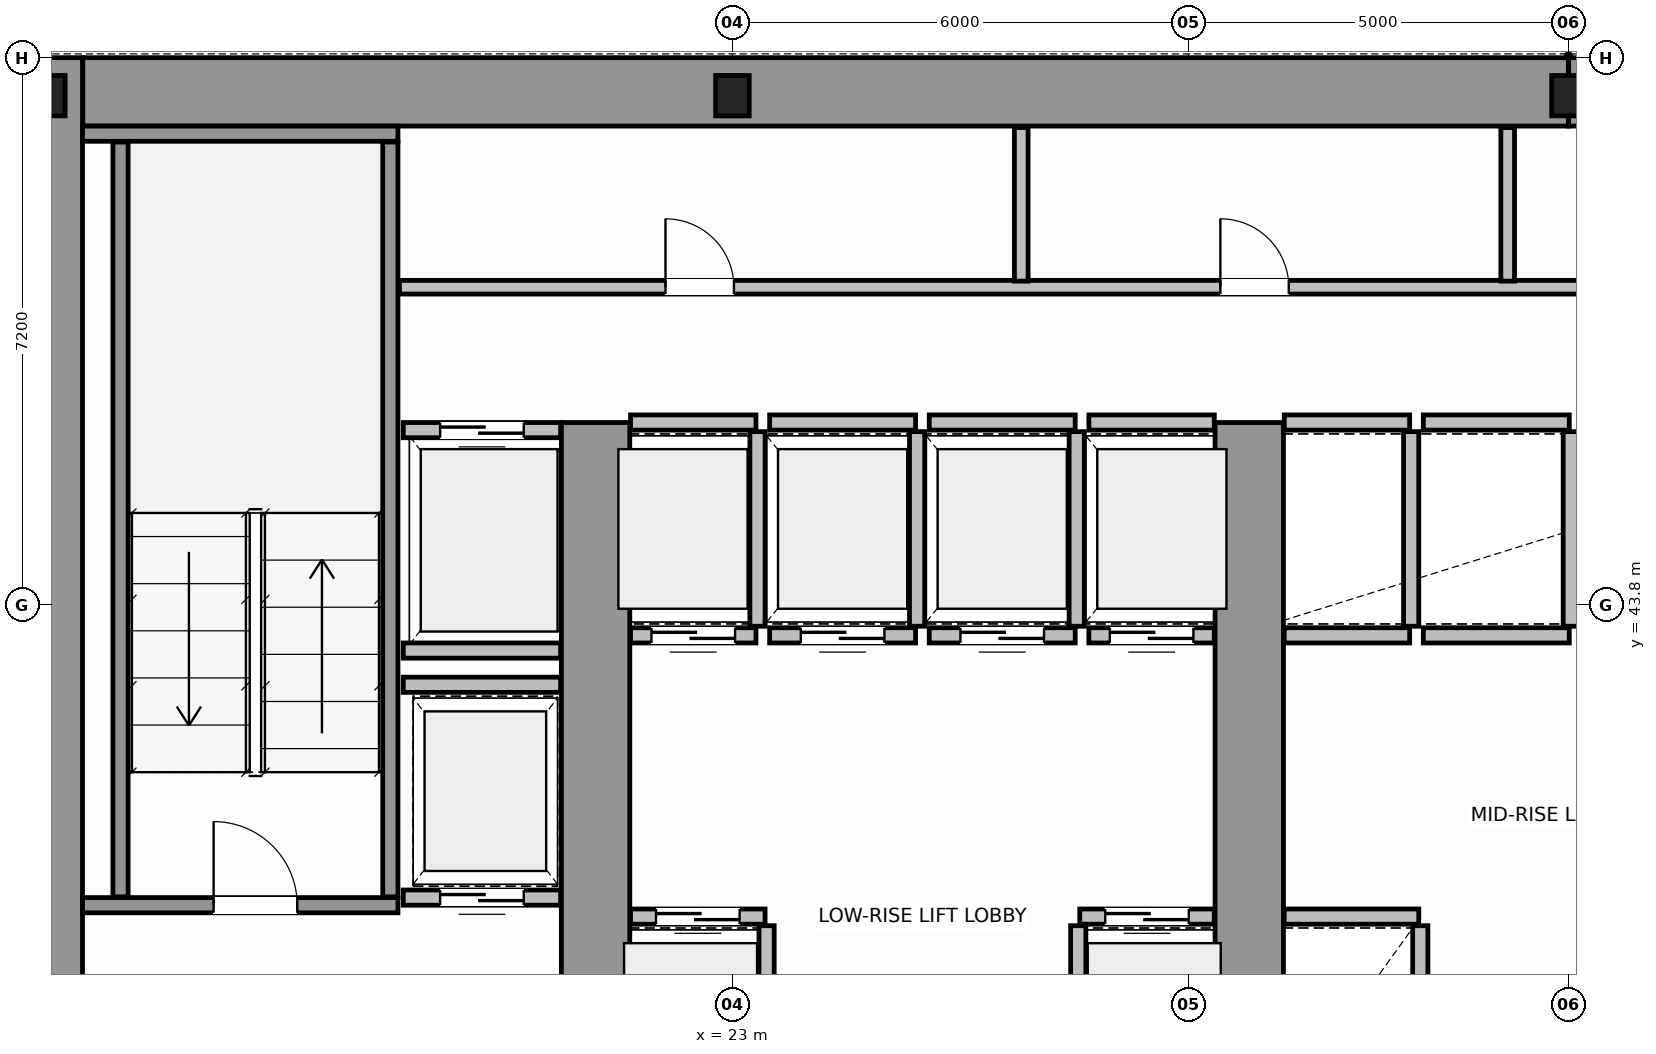
"""IFC4 building model, lengths in metres.
Left out: names, types, materials, properties, quantities, classifications, styles, units other than length and angle.
Written with IfcOpenShell. Run it as: python <this file> out.ifc"""

import sys

from ifc_helpers import new_model, si_unit, direction, frame, frame_2d, origin, origin_2d, place, context, subcontext, project, spatial, rectangle, i_section, extrude, source, transform, mapped, element, fill, save


model = new_model("IFC4")
c1 = context("Model", 3, precision=1e-05, world=origin(), true_north=direction((0.0, 1.0)))
c2 = subcontext(c1, "Body", "Model", "MODEL_VIEW")
j1 = project(units=[si_unit("LENGTHUNIT", "METRE"), si_unit("PLANEANGLEUNIT", "RADIAN")], contexts=[c1])
p1 = place(None, origin())
s1 = spatial("IfcSite", under=j1, at=p1, CompositionType="ELEMENT")
p2 = place(p1, origin())
s2 = spatial("IfcBuilding", under=s1, at=p2, CompositionType="ELEMENT")
p3 = place(p2, frame((0.0, 0.0, 72.0)))
s3 = spatial("IfcBuildingStorey", under=s2, at=p3, CompositionType="ELEMENT", Elevation=72.0)
m1 = source(origin(), c2, "Body", "SweptSolid", [
    extrude(i_section(OverallWidth=0.442, OverallDepth=0.531, WebThickness=0.065, FlangeThickness=0.076, FilletRadius=0.015, at=origin_2d()), origin(), (0.0, 0.0, 1.0), 3.8),
])
for number, where, z_axis, x_axis in (
    (1, (14.0, 50.5, 0.0), (0.0, 0.0, 1.0), (1.0, 0.0, 0.0)),
    (2, (23.0, 50.5, 0.0), (0.0, 0.0, 1.0), (1.0, 0.0, 0.0)),
    (3, (34.0, 50.5, 0.0), (0.0, 0.0, 1.0), (1.0, 0.0, 0.0)),
):
    element("IfcColumn", number, at=place(p3, frame(where, z_axis=z_axis, x_axis=x_axis)), inside=s3, PredefinedType="COLUMN", context=c2, shape_type="MappedRepresentation", body=[
        mapped(m1, transform((0.0, 0.0, 0.0), scale=1.0)),
    ])
for number, where, z_axis, x_axis in (
    (4, (14.454, 50.55, 0.0), (0.0, 0.0, 1.0), (1.0, 0.0, 0.0)),
    (5, (34.002, 50.55, 0.0), (0.0, 0.0, 1.0), (1.0, 0.0, 0.0)),
):
    element("IfcWall", number, at=place(p3, frame(where, z_axis=z_axis, x_axis=x_axis)), inside=s3, PredefinedType="SHEAR", context=c2, shape_type="SweptSolid", body=[
        extrude(rectangle(XDim=19.544, YDim=0.9, at=frame_2d((9.772, 0.0))), origin(), (0.0, 0.0, 1.0), 3.8),
    ])
p4 = place(p3, frame((14.0, 36.5, 0.0), z_axis=(0.0, 0.0, 1.0), x_axis=(0.0, 1.0, 0.0)))
e6 = element("IfcWall", 6, at=p4, inside=s3, PredefinedType="SHEAR", context=c2, shape_type="SweptSolid", body=[
    extrude(rectangle(XDim=14.5, YDim=0.9, at=frame_2d((7.25, 0.0))), origin(), (0.0, 0.0, 1.0), 3.8),
])
for number, where, z_axis, x_axis in (
    (7, (21.2, 36.97, 0.0), (0.0, 0.0, 1.0), (0.0, 1.0, 0.0)),
    (8, (29.8, 36.97, 0.0), (0.0, 0.0, 1.0), (0.0, 1.0, 0.0)),
):
    element("IfcWall", number, at=place(p3, frame(where, z_axis=z_axis, x_axis=x_axis)), inside=s3, PredefinedType="SHEAR", context=c2, shape_type="SweptSolid", body=[
        extrude(rectangle(XDim=9.23, YDim=0.9, at=frame_2d((4.615, 0.0))), origin(), (0.0, 0.0, 1.0), 3.8),
    ])
p5 = place(p3, frame((14.45, 39.85, 0.0), z_axis=(0.0, 0.0, 1.0), x_axis=(1.0, 0.0, 0.0)))
e9 = element("IfcWall", 9, at=p5, inside=s3, PredefinedType="SOLIDWALL", context=c2, shape_type="SweptSolid", body=[
    extrude(rectangle(XDim=4.15, YDim=0.2, at=frame_2d((2.075, 0.0))), origin(), (0.0, 0.0, 1.0), 3.8),
])
p6 = place(p5, frame((1.725, 0.0, 0.0)))
e10 = element("IfcOpeningElement", 10, at=p6, cuts=e9, PredefinedType="OPENING", context=c2, shape_type="SweptSolid", body=[
    extrude(rectangle(XDim=1.1, YDim=2.15, at=frame_2d((0.55, 1.075))), frame((0.0, 0.11, 0.0), z_axis=(0.0, -1.0, 0.0), x_axis=(1.0, 0.0, 0.0)), (0.0, 0.0, 1.0), 0.22),
])
p7 = place(p3, frame((14.45, 50.0, 0.0), z_axis=(0.0, 0.0, 1.0), x_axis=(1.0, 0.0, 0.0)))
e11 = element("IfcWall", 11, at=p7, inside=s3, PredefinedType="SOLIDWALL", context=c2, shape_type="SweptSolid", body=[
    extrude(rectangle(XDim=4.15, YDim=0.2, at=frame_2d((2.075, 0.0))), origin(), (0.0, 0.0, 1.0), 3.8),
])
for number, where, z_axis, x_axis in (
    (12, (14.95, 39.96, 0.0), (0.0, 0.0, 1.0), (0.0, 1.0, 0.0)),
    (13, (18.5, 39.96, 0.0), (0.0, 0.0, 1.0), (0.0, 1.0, 0.0)),
):
    element("IfcWall", number, at=place(p3, frame(where, z_axis=z_axis, x_axis=x_axis)), inside=s3, PredefinedType="SOLIDWALL", context=c2, shape_type="SweptSolid", body=[
        extrude(rectangle(XDim=9.93, YDim=0.2, at=frame_2d((4.965, 0.0))), origin(), (0.0, 0.0, 1.0), 3.8),
    ])
p8 = place(p3, frame((21.66, 39.7, 0.0), z_axis=(0.0, 0.0, 1.0), x_axis=(1.0, 0.0, 0.0)))
e14 = element("IfcWall", 14, at=p8, inside=s3, PredefinedType="SOLIDWALL", context=c2, shape_type="SweptSolid", body=[
    extrude(rectangle(XDim=1.77, YDim=0.2, at=frame_2d((0.885, 0.0))), origin(), (0.0, 0.0, 1.0), 3.58),
])
p9 = place(p8, frame((0.335, 0.0, 0.0)))
e15 = element("IfcOpeningElement", 15, at=p9, cuts=e14, PredefinedType="OPENING", context=c2, shape_type="SweptSolid", body=[
    extrude(rectangle(XDim=1.1, YDim=2.15, at=frame_2d((0.55, 1.075))), frame((0.0, 0.11, 0.0), z_axis=(0.0, -1.0, 0.0), x_axis=(1.0, 0.0, 0.0)), (0.0, 0.0, 1.0), 0.22),
])
p10 = place(p3, frame((23.45, 37.02, 0.0), z_axis=(0.0, 0.0, 1.0), x_axis=(0.0, 1.0, 0.0)))
e16 = element("IfcWall", 16, at=p10, inside=s3, PredefinedType="SOLIDWALL", context=c2, shape_type="SweptSolid", body=[
    extrude(rectangle(XDim=2.56, YDim=0.2, at=frame_2d((1.28, 0.0))), origin(), (0.0, 0.0, 1.0), 3.58),
])
p11 = place(p3, frame((27.57, 39.7, 0.0), z_axis=(0.0, 0.0, 1.0), x_axis=(1.0, 0.0, 0.0)))
e17 = element("IfcWall", 17, at=p11, inside=s3, PredefinedType="SOLIDWALL", context=c2, shape_type="SweptSolid", body=[
    extrude(rectangle(XDim=1.77, YDim=0.2, at=frame_2d((0.885, 0.0))), origin(), (0.0, 0.0, 1.0), 3.58),
])
p12 = place(p11, frame((0.335, 0.0, 0.0)))
e18 = element("IfcOpeningElement", 18, at=p12, cuts=e17, PredefinedType="OPENING", context=c2, shape_type="SweptSolid", body=[
    extrude(rectangle(XDim=1.1, YDim=2.15, at=frame_2d((0.55, 1.075))), frame((0.0, 0.11, 0.0), z_axis=(0.0, -1.0, 0.0), x_axis=(1.0, 0.0, 0.0)), (0.0, 0.0, 1.0), 0.22),
])
p13 = place(p3, frame((27.55, 37.02, 0.0), z_axis=(0.0, 0.0, 1.0), x_axis=(0.0, 1.0, 0.0)))
e19 = element("IfcWall", 19, at=p13, inside=s3, PredefinedType="SOLIDWALL", context=c2, shape_type="SweptSolid", body=[
    extrude(rectangle(XDim=2.56, YDim=0.2, at=frame_2d((1.28, 0.0))), origin(), (0.0, 0.0, 1.0), 3.58),
])
p14 = place(p3, frame((21.66, 43.4, 0.0), z_axis=(0.0, 0.0, 1.0), x_axis=(1.0, 0.0, 0.0)))
e20 = element("IfcWall", 20, at=p14, inside=s3, PredefinedType="SOLIDWALL", context=c2, shape_type="SweptSolid", body=[
    extrude(rectangle(XDim=1.65, YDim=0.2, at=frame_2d((0.825, 0.0))), origin(), (0.0, 0.0, 1.0), 3.58),
])
p15 = place(p14, frame((0.275, 0.0, 0.0)))
e21 = element("IfcOpeningElement", 21, at=p15, cuts=e20, PredefinedType="OPENING", context=c2, shape_type="SweptSolid", body=[
    extrude(rectangle(XDim=1.1, YDim=2.15, at=frame_2d((0.55, 1.075))), frame((0.0, 0.11, 0.0), z_axis=(0.0, -1.0, 0.0), x_axis=(1.0, 0.0, 0.0)), (0.0, 0.0, 1.0), 0.22),
])
p16 = place(p3, frame((21.66, 46.2, 0.0), z_axis=(0.0, 0.0, 1.0), x_axis=(1.0, 0.0, 0.0)))
e22 = element("IfcWall", 22, at=p16, inside=s3, PredefinedType="SOLIDWALL", context=c2, shape_type="SweptSolid", body=[
    extrude(rectangle(XDim=1.65, YDim=0.2, at=frame_2d((0.825, 0.0))), origin(), (0.0, 0.0, 1.0), 3.58),
])
p17 = place(p3, frame((23.33, 43.52, 0.0), z_axis=(0.0, 0.0, 1.0), x_axis=(0.0, 1.0, 0.0)))
e23 = element("IfcWall", 23, at=p17, inside=s3, PredefinedType="SOLIDWALL", context=c2, shape_type="SweptSolid", body=[
    extrude(rectangle(XDim=2.56, YDim=0.2, at=frame_2d((1.28, 0.0))), origin(), (0.0, 0.0, 1.0), 3.58),
])
p18 = place(p3, frame((23.49, 43.4, 0.0), z_axis=(0.0, 0.0, 1.0), x_axis=(1.0, 0.0, 0.0)))
e24 = element("IfcWall", 24, at=p18, inside=s3, PredefinedType="SOLIDWALL", context=c2, shape_type="SweptSolid", body=[
    extrude(rectangle(XDim=1.92, YDim=0.2, at=frame_2d((0.96, 0.0))), origin(), (0.0, 0.0, 1.0), 3.58),
])
p19 = place(p18, frame((0.41, 0.0, 0.0)))
e25 = element("IfcOpeningElement", 25, at=p19, cuts=e24, PredefinedType="OPENING", context=c2, shape_type="SweptSolid", body=[
    extrude(rectangle(XDim=1.1, YDim=2.15, at=frame_2d((0.55, 1.075))), frame((0.0, 0.11, 0.0), z_axis=(0.0, -1.0, 0.0), x_axis=(1.0, 0.0, 0.0)), (0.0, 0.0, 1.0), 0.22),
])
p20 = place(p3, frame((23.49, 46.2, 0.0), z_axis=(0.0, 0.0, 1.0), x_axis=(1.0, 0.0, 0.0)))
e26 = element("IfcWall", 26, at=p20, inside=s3, PredefinedType="SOLIDWALL", context=c2, shape_type="SweptSolid", body=[
    extrude(rectangle(XDim=1.92, YDim=0.2, at=frame_2d((0.96, 0.0))), origin(), (0.0, 0.0, 1.0), 3.58),
])
p21 = place(p3, frame((25.43, 43.52, 0.0), z_axis=(0.0, 0.0, 1.0), x_axis=(0.0, 1.0, 0.0)))
e27 = element("IfcWall", 27, at=p21, inside=s3, PredefinedType="SOLIDWALL", context=c2, shape_type="SweptSolid", body=[
    extrude(rectangle(XDim=2.56, YDim=0.2, at=frame_2d((1.28, 0.0))), origin(), (0.0, 0.0, 1.0), 3.58),
])
p22 = place(p3, frame((25.59, 43.4, 0.0), z_axis=(0.0, 0.0, 1.0), x_axis=(1.0, 0.0, 0.0)))
e28 = element("IfcWall", 28, at=p22, inside=s3, PredefinedType="SOLIDWALL", context=c2, shape_type="SweptSolid", body=[
    extrude(rectangle(XDim=1.92, YDim=0.2, at=frame_2d((0.96, 0.0))), origin(), (0.0, 0.0, 1.0), 3.58),
])
p23 = place(p22, frame((0.41, 0.0, 0.0)))
e29 = element("IfcOpeningElement", 29, at=p23, cuts=e28, PredefinedType="OPENING", context=c2, shape_type="SweptSolid", body=[
    extrude(rectangle(XDim=1.1, YDim=2.15, at=frame_2d((0.55, 1.075))), frame((0.0, 0.11, 0.0), z_axis=(0.0, -1.0, 0.0), x_axis=(1.0, 0.0, 0.0)), (0.0, 0.0, 1.0), 0.22),
])
p24 = place(p3, frame((25.59, 46.2, 0.0), z_axis=(0.0, 0.0, 1.0), x_axis=(1.0, 0.0, 0.0)))
e30 = element("IfcWall", 30, at=p24, inside=s3, PredefinedType="SOLIDWALL", context=c2, shape_type="SweptSolid", body=[
    extrude(rectangle(XDim=1.92, YDim=0.2, at=frame_2d((0.96, 0.0))), origin(), (0.0, 0.0, 1.0), 3.58),
])
p25 = place(p3, frame((27.53, 43.52, 0.0), z_axis=(0.0, 0.0, 1.0), x_axis=(0.0, 1.0, 0.0)))
e31 = element("IfcWall", 31, at=p25, inside=s3, PredefinedType="SOLIDWALL", context=c2, shape_type="SweptSolid", body=[
    extrude(rectangle(XDim=2.56, YDim=0.2, at=frame_2d((1.28, 0.0))), origin(), (0.0, 0.0, 1.0), 3.58),
])
p26 = place(p3, frame((27.69, 43.4, 0.0), z_axis=(0.0, 0.0, 1.0), x_axis=(1.0, 0.0, 0.0)))
e32 = element("IfcWall", 32, at=p26, inside=s3, PredefinedType="SOLIDWALL", context=c2, shape_type="SweptSolid", body=[
    extrude(rectangle(XDim=1.65, YDim=0.2, at=frame_2d((0.825, 0.0))), origin(), (0.0, 0.0, 1.0), 3.58),
])
p27 = place(p26, frame((0.275, 0.0, 0.0)))
e33 = element("IfcOpeningElement", 33, at=p27, cuts=e32, PredefinedType="OPENING", context=c2, shape_type="SweptSolid", body=[
    extrude(rectangle(XDim=1.1, YDim=2.15, at=frame_2d((0.55, 1.075))), frame((0.0, 0.11, 0.0), z_axis=(0.0, -1.0, 0.0), x_axis=(1.0, 0.0, 0.0)), (0.0, 0.0, 1.0), 0.22),
])
p28 = place(p3, frame((27.69, 46.2, 0.0), z_axis=(0.0, 0.0, 1.0), x_axis=(1.0, 0.0, 0.0)))
e34 = element("IfcWall", 34, at=p28, inside=s3, PredefinedType="SOLIDWALL", context=c2, shape_type="SweptSolid", body=[
    extrude(rectangle(XDim=1.65, YDim=0.2, at=frame_2d((0.825, 0.0))), origin(), (0.0, 0.0, 1.0), 3.58),
])
p29 = place(p3, frame((30.26, 39.7, 0.0), z_axis=(0.0, 0.0, 1.0), x_axis=(1.0, 0.0, 0.0)))
e35 = element("IfcWall", 35, at=p29, inside=s3, PredefinedType="SOLIDWALL", context=c2, shape_type="SweptSolid", body=[
    extrude(rectangle(XDim=1.77, YDim=0.2, at=frame_2d((0.885, 0.0))), origin(), (0.0, 0.0, 1.0), 3.58),
])
p30 = place(p3, frame((32.05, 37.02, 0.0), z_axis=(0.0, 0.0, 1.0), x_axis=(0.0, 1.0, 0.0)))
e36 = element("IfcWall", 36, at=p30, inside=s3, PredefinedType="SOLIDWALL", context=c2, shape_type="SweptSolid", body=[
    extrude(rectangle(XDim=2.56, YDim=0.2, at=frame_2d((1.28, 0.0))), origin(), (0.0, 0.0, 1.0), 3.58),
])
for number, where, z_axis, x_axis in (
    (37, (30.26, 43.4, 0.0), (0.0, 0.0, 1.0), (1.0, 0.0, 0.0)),
    (38, (30.26, 46.2, 0.0), (0.0, 0.0, 1.0), (1.0, 0.0, 0.0)),
):
    element("IfcWall", number, at=place(p3, frame(where, z_axis=z_axis, x_axis=x_axis)), inside=s3, PredefinedType="SOLIDWALL", context=c2, shape_type="SweptSolid", body=[
        extrude(rectangle(XDim=1.65, YDim=0.2, at=frame_2d((0.825, 0.0))), origin(), (0.0, 0.0, 1.0), 3.58),
    ])
p31 = place(p3, frame((31.93, 43.52, 0.0), z_axis=(0.0, 0.0, 1.0), x_axis=(0.0, 1.0, 0.0)))
e39 = element("IfcWall", 39, at=p31, inside=s3, PredefinedType="SOLIDWALL", context=c2, shape_type="SweptSolid", body=[
    extrude(rectangle(XDim=2.56, YDim=0.2, at=frame_2d((1.28, 0.0))), origin(), (0.0, 0.0, 1.0), 3.58),
])
for number, where, z_axis, x_axis in (
    (40, (32.09, 43.4, 0.0), (0.0, 0.0, 1.0), (1.0, 0.0, 0.0)),
    (41, (32.09, 46.2, 0.0), (0.0, 0.0, 1.0), (1.0, 0.0, 0.0)),
):
    element("IfcWall", number, at=place(p3, frame(where, z_axis=z_axis, x_axis=x_axis)), inside=s3, PredefinedType="SOLIDWALL", context=c2, shape_type="SweptSolid", body=[
        extrude(rectangle(XDim=1.92, YDim=0.2, at=frame_2d((0.96, 0.0))), origin(), (0.0, 0.0, 1.0), 3.58),
    ])
p32 = place(p3, frame((34.03, 43.52, 0.0), z_axis=(0.0, 0.0, 1.0), x_axis=(0.0, 1.0, 0.0)))
e42 = element("IfcWall", 42, at=p32, inside=s3, PredefinedType="SOLIDWALL", context=c2, shape_type="SweptSolid", body=[
    extrude(rectangle(XDim=2.56, YDim=0.2, at=frame_2d((1.28, 0.0))), origin(), (0.0, 0.0, 1.0), 3.58),
])
p33 = place(p3, frame((18.67, 46.1, 0.0), z_axis=(0.0, 0.0, 1.0), x_axis=(1.0, 0.0, 0.0)))
e43 = element("IfcWall", 43, at=p33, inside=s3, PredefinedType="SOLIDWALL", context=c2, shape_type="SweptSolid", body=[
    extrude(rectangle(XDim=2.07, YDim=0.2, at=frame_2d((1.035, 0.0))), origin(), (0.0, 0.0, 1.0), 3.58),
])
p34 = place(p33, frame((0.485, 0.0, 0.0)))
e44 = element("IfcOpeningElement", 44, at=p34, cuts=e43, PredefinedType="OPENING", context=c2, shape_type="SweptSolid", body=[
    extrude(rectangle(XDim=1.1, YDim=2.15, at=frame_2d((0.55, 1.075))), frame((0.0, 0.11, 0.0), z_axis=(0.0, -1.0, 0.0), x_axis=(1.0, 0.0, 0.0)), (0.0, 0.0, 1.0), 0.22),
])
p35 = place(p3, frame((18.67, 43.2, 0.0), z_axis=(0.0, 0.0, 1.0), x_axis=(1.0, 0.0, 0.0)))
e45 = element("IfcWall", 45, at=p35, inside=s3, PredefinedType="SOLIDWALL", context=c2, shape_type="SweptSolid", body=[
    extrude(rectangle(XDim=2.07, YDim=0.2, at=frame_2d((1.035, 0.0))), origin(), (0.0, 0.0, 1.0), 3.58),
])
p36 = place(p3, frame((18.67, 39.95, 0.0), z_axis=(0.0, 0.0, 1.0), x_axis=(1.0, 0.0, 0.0)))
e46 = element("IfcWall", 46, at=p36, inside=s3, PredefinedType="SOLIDWALL", context=c2, shape_type="SweptSolid", body=[
    extrude(rectangle(XDim=2.07, YDim=0.2, at=frame_2d((1.035, 0.0))), origin(), (0.0, 0.0, 1.0), 3.58),
])
p37 = place(p36, frame((0.485, 0.0, 0.0)))
e47 = element("IfcOpeningElement", 47, at=p37, cuts=e46, PredefinedType="OPENING", context=c2, shape_type="SweptSolid", body=[
    extrude(rectangle(XDim=1.1, YDim=2.15, at=frame_2d((0.55, 1.075))), frame((0.0, 0.11, 0.0), z_axis=(0.0, -1.0, 0.0), x_axis=(1.0, 0.0, 0.0)), (0.0, 0.0, 1.0), 0.22),
])
p38 = place(p3, frame((18.67, 42.75, 0.0), z_axis=(0.0, 0.0, 1.0), x_axis=(1.0, 0.0, 0.0)))
e48 = element("IfcWall", 48, at=p38, inside=s3, PredefinedType="SOLIDWALL", context=c2, shape_type="SweptSolid", body=[
    extrude(rectangle(XDim=2.07, YDim=0.2, at=frame_2d((1.035, 0.0))), origin(), (0.0, 0.0, 1.0), 3.58),
])
p39 = place(p3, frame((18.62, 47.98, 0.0), z_axis=(0.0, 0.0, 1.0), x_axis=(1.0, 0.0, 0.0)))
e49 = element("IfcWall", 49, at=p39, inside=s3, PredefinedType="PLUMBINGWALL", context=c2, shape_type="SweptSolid", body=[
    extrude(rectangle(XDim=20.06, YDim=0.18, at=frame_2d((10.03, 0.0))), origin(), (0.0, 0.0, 1.0), 3.58),
])
p40 = place(p39, frame((3.5, 0.0, 0.0)))
e50 = element("IfcOpeningElement", 50, at=p40, cuts=e49, PredefinedType="OPENING", context=c2, shape_type="SweptSolid", body=[
    extrude(rectangle(XDim=0.9, YDim=2.15, at=frame_2d((0.45, 1.075))), frame((0.0, 0.1, 0.0), z_axis=(0.0, -1.0, 0.0), x_axis=(1.0, 0.0, 0.0)), (0.0, 0.0, 1.0), 0.2),
])
p41 = place(p39, frame((10.8, 0.0, 0.0)))
e51 = element("IfcOpeningElement", 51, at=p41, cuts=e49, PredefinedType="OPENING", context=c2, shape_type="SweptSolid", body=[
    extrude(rectangle(XDim=0.9, YDim=2.15, at=frame_2d((0.45, 1.075))), frame((0.0, 0.1, 0.0), z_axis=(0.0, -1.0, 0.0), x_axis=(1.0, 0.0, 0.0)), (0.0, 0.0, 1.0), 0.2),
])
p42 = place(p39, frame((16.8, 0.0, 0.0)))
e52 = element("IfcOpeningElement", 52, at=p42, cuts=e49, PredefinedType="OPENING", context=c2, shape_type="SweptSolid", body=[
    extrude(rectangle(XDim=0.9, YDim=2.15, at=frame_2d((0.45, 1.075))), frame((0.0, 0.1, 0.0), z_axis=(0.0, -1.0, 0.0), x_axis=(1.0, 0.0, 0.0)), (0.0, 0.0, 1.0), 0.2),
])
for number, where, z_axis, x_axis in (
    (53, (26.8, 48.06, 0.0), (0.0, 0.0, 1.0), (0.0, 1.0, 0.0)),
    (54, (33.2, 48.06, 0.0), (0.0, 0.0, 1.0), (0.0, 1.0, 0.0)),
):
    element("IfcWall", number, at=place(p3, frame(where, z_axis=z_axis, x_axis=x_axis)), inside=s3, PredefinedType="PLUMBINGWALL", context=c2, shape_type="SweptSolid", body=[
        extrude(rectangle(XDim=2.02, YDim=0.18, at=frame_2d((1.01, 0.0))), origin(), (0.0, 0.0, 1.0), 3.58),
    ])
m2 = source(origin(), c2, "Body", "SweptSolid", [
    extrude(rectangle(XDim=1.1, YDim=2.15, at=frame_2d((0.55, 1.075))), frame((0.0, 0.025, 0.0), z_axis=(0.0, -1.0, 0.0), x_axis=(1.0, 0.0, 0.0)), (0.0, 0.0, 1.0), 0.05),
])
p43 = place(p6, origin())
e55 = element("IfcDoor", 55, at=p43, inside=s3, OperationType="SINGLE_SWING_LEFT", PredefinedType="DOOR", context=c2, shape_type="MappedRepresentation", body=[
    mapped(m2, transform((0.0, 0.0, 0.0), scale=1.0)),
])
fill(e10, e55)
p44 = place(p9, origin())
e56 = element("IfcDoor", 56, at=p44, inside=s3, OperationType="DOUBLE_DOOR_SLIDING", PredefinedType="DOOR", context=c2, shape_type="MappedRepresentation", body=[
    mapped(m2, transform((0.0, 0.0, 0.0), scale=1.0)),
])
fill(e15, e56)
p45 = place(p12, origin())
e57 = element("IfcDoor", 57, at=p45, inside=s3, OperationType="DOUBLE_DOOR_SLIDING", PredefinedType="DOOR", context=c2, shape_type="MappedRepresentation", body=[
    mapped(m2, transform((0.0, 0.0, 0.0), scale=1.0)),
])
fill(e18, e57)
p46 = place(p15, origin())
e58 = element("IfcDoor", 58, at=p46, inside=s3, OperationType="DOUBLE_DOOR_SLIDING", PredefinedType="DOOR", context=c2, shape_type="MappedRepresentation", body=[
    mapped(m2, transform((0.0, 0.0, 0.0), scale=1.0)),
])
fill(e21, e58)
p47 = place(p19, origin())
e59 = element("IfcDoor", 59, at=p47, inside=s3, OperationType="DOUBLE_DOOR_SLIDING", PredefinedType="DOOR", context=c2, shape_type="MappedRepresentation", body=[
    mapped(m2, transform((0.0, 0.0, 0.0), scale=1.0)),
])
fill(e25, e59)
p48 = place(p23, origin())
e60 = element("IfcDoor", 60, at=p48, inside=s3, OperationType="DOUBLE_DOOR_SLIDING", PredefinedType="DOOR", context=c2, shape_type="MappedRepresentation", body=[
    mapped(m2, transform((0.0, 0.0, 0.0), scale=1.0)),
])
fill(e29, e60)
p49 = place(p27, origin())
e61 = element("IfcDoor", 61, at=p49, inside=s3, OperationType="DOUBLE_DOOR_SLIDING", PredefinedType="DOOR", context=c2, shape_type="MappedRepresentation", body=[
    mapped(m2, transform((0.0, 0.0, 0.0), scale=1.0)),
])
fill(e33, e61)
p50 = place(p34, origin())
e62 = element("IfcDoor", 62, at=p50, inside=s3, OperationType="DOUBLE_DOOR_SLIDING", PredefinedType="DOOR", context=c2, shape_type="MappedRepresentation", body=[
    mapped(m2, transform((0.0, 0.0, 0.0), scale=1.0)),
])
fill(e44, e62)
p51 = place(p37, origin())
e63 = element("IfcDoor", 63, at=p51, inside=s3, OperationType="DOUBLE_DOOR_SLIDING", PredefinedType="DOOR", context=c2, shape_type="MappedRepresentation", body=[
    mapped(m2, transform((0.0, 0.0, 0.0), scale=1.0)),
])
fill(e47, e63)
m3 = source(origin(), c2, "Body", "SweptSolid", [
    extrude(rectangle(XDim=0.9, YDim=2.15, at=frame_2d((0.45, 1.075))), frame((0.0, 0.025, 0.0), z_axis=(0.0, -1.0, 0.0), x_axis=(1.0, 0.0, 0.0)), (0.0, 0.0, 1.0), 0.05),
])
p52 = place(p40, origin())
e64 = element("IfcDoor", 64, at=p52, inside=s3, OperationType="SINGLE_SWING_LEFT", PredefinedType="DOOR", context=c2, shape_type="MappedRepresentation", body=[
    mapped(m3, transform((0.0, 0.0, 0.0), scale=1.0)),
])
fill(e50, e64)
p53 = place(p41, origin())
e65 = element("IfcDoor", 65, at=p53, inside=s3, OperationType="SINGLE_SWING_RIGHT", PredefinedType="DOOR", context=c2, shape_type="MappedRepresentation", body=[
    mapped(m3, transform((0.0, 0.0, 0.0), scale=1.0)),
])
fill(e51, e65)
save(model, sys.argv[1])
